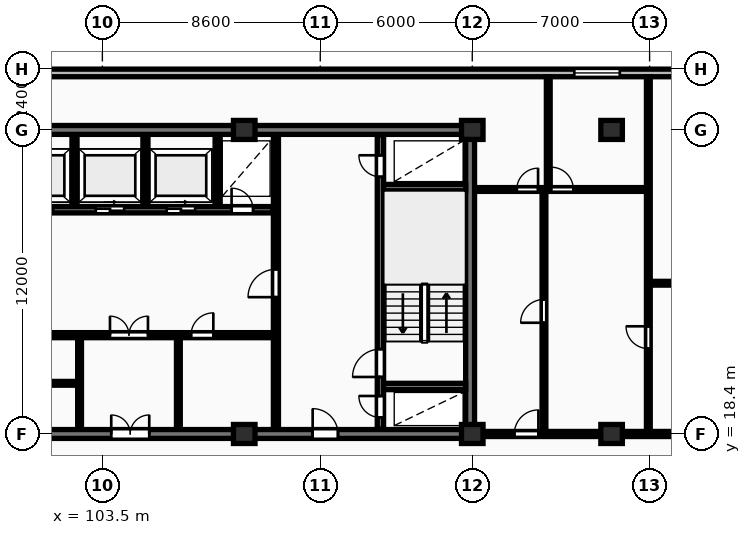
"""IFC4 building model, lengths in metres.
Left out: names, types, materials, properties, quantities, classifications, styles, units other than length and angle.
Written with IfcOpenShell. Run it as: python <this file> out.ifc"""

import sys

from ifc_helpers import new_model, si_unit, direction, frame, frame_2d, origin, origin_2d, place, context, subcontext, project, spatial, rectangle, extrude, element, fill, save


model = new_model("IFC4")
c1 = context("Model", 3, precision=1e-05, world=origin(), true_north=direction((0.0, 1.0)))
c2 = subcontext(c1, "Body", "Model", "MODEL_VIEW")
j1 = project(units=[si_unit("LENGTHUNIT", "METRE"), si_unit("PLANEANGLEUNIT", "RADIAN")], contexts=[c1])
p1 = place(None, origin())
s1 = spatial("IfcSite", under=j1, at=p1, CompositionType="ELEMENT")
p2 = place(p1, origin())
s2 = spatial("IfcBuilding", under=s1, at=p2, CompositionType="ELEMENT")
p3 = place(p2, frame((0.0, 0.0, 100.3)))
s3 = spatial("IfcBuildingStorey", under=s2, at=p3, CompositionType="ELEMENT", Elevation=100.3)
for number, where, z_axis, x_axis in (
    (1, (109.1, 18.4, 0.0), (0.0, 0.0, 1.0), (1.0, 0.0, 0.0)),
    (2, (109.1, 30.4, 0.0), (0.0, 0.0, 1.0), (1.0, 0.0, 0.0)),
    (3, (118.1, 18.4, 0.0), (0.0, 0.0, 1.0), (1.0, 0.0, 0.0)),
    (4, (118.1, 30.4, 0.0), (0.0, 0.0, 1.0), (1.0, 0.0, 0.0)),
    (5, (123.6, 18.4, 0.0), (0.0, 0.0, 1.0), (1.0, 0.0, 0.0)),
    (6, (123.6, 30.4, 0.0), (0.0, 0.0, 1.0), (1.0, 0.0, 0.0)),
):
    element("IfcColumn", number, at=place(p3, frame(where, z_axis=z_axis, x_axis=x_axis)), inside=s3, PredefinedType="COLUMN", context=c2, shape_type="SweptSolid", body=[
        extrude(rectangle(XDim=0.85, YDim=0.75, at=origin_2d()), origin(), (0.0, 0.0, 1.0), 3.25),
    ])
p4 = place(p3, frame((130.7, 32.65, 0.0), z_axis=(0.0, 0.0, 1.0), x_axis=(-1.0, 0.0, 0.0)))
e7 = element("IfcWall", 7, at=p4, inside=s3, PredefinedType="STANDARD", context=c2, shape_type="SweptSolid", body=[
    extrude(rectangle(XDim=58.0, YDim=0.3, at=frame_2d((29.0, 0.0))), origin(), (0.0, 0.0, 1.0), 2.97),
])
p5 = place(p4, frame((50.125, 0.0, 0.85)))
e8 = element("IfcOpeningElement", 8, at=p5, cuts=e7, PredefinedType="OPENING", context=c2, shape_type="SweptSolid", body=[
    extrude(rectangle(XDim=1.8, YDim=1.8, at=frame_2d((0.9, 0.9))), frame((0.0, 0.16, 0.0), z_axis=(0.0, -1.0, 0.0), x_axis=(1.0, 0.0, 0.0)), (0.0, 0.0, 1.0), 0.32),
])
p6 = place(p4, frame((6.775, 0.0, 0.85)))
e9 = element("IfcOpeningElement", 9, at=p6, cuts=e7, PredefinedType="OPENING", context=c2, shape_type="SweptSolid", body=[
    extrude(rectangle(XDim=1.8, YDim=1.8, at=frame_2d((0.9, 0.9))), frame((0.0, 0.16, 0.0), z_axis=(0.0, -1.0, 0.0), x_axis=(1.0, 0.0, 0.0)), (0.0, 0.0, 1.0), 0.32),
])
p7 = place(p3, frame((81.925, 30.4, 0.0), z_axis=(0.0, 0.0, 1.0), x_axis=(1.0, 0.0, 0.0)))
e10 = element("IfcWall", 10, at=p7, inside=s3, PredefinedType="SHEAR", context=c2, shape_type="SweptSolid", body=[
    extrude(rectangle(XDim=36.265, YDim=0.35, at=frame_2d((18.132, 0.0))), origin(), (0.0, 0.0, 1.0), 3.25),
])
p8 = place(p3, frame((118.015, 18.575, 0.0), z_axis=(0.0, 0.0, 1.0), x_axis=(0.0, 1.0, 0.0)))
e11 = element("IfcWall", 11, at=p8, inside=s3, PredefinedType="SHEAR", context=c2, shape_type="SweptSolid", body=[
    extrude(rectangle(XDim=11.65, YDim=0.35, at=frame_2d((5.825, 0.0))), origin(), (0.0, 0.0, 1.0), 3.25),
])
p9 = place(p3, frame((81.925, 18.4, 0.0), z_axis=(0.0, 0.0, 1.0), x_axis=(1.0, 0.0, 0.0)))
e12 = element("IfcWall", 12, at=p9, inside=s3, PredefinedType="SHEAR", context=c2, shape_type="SweptSolid", body=[
    extrude(rectangle(XDim=36.265, YDim=0.35, at=frame_2d((18.132, 0.0))), origin(), (0.0, 0.0, 1.0), 3.25),
])
p10 = place(p9, frame((5.675, 0.0, 0.0)))
e13 = element("IfcOpeningElement", 13, at=p10, cuts=e12, PredefinedType="OPENING", context=c2, shape_type="SweptSolid", body=[
    extrude(rectangle(XDim=1.0, YDim=2.15, at=frame_2d((0.5, 1.075))), frame((0.0, 0.185, 0.0), z_axis=(0.0, -1.0, 0.0), x_axis=(1.0, 0.0, 0.0)), (0.0, 0.0, 1.0), 0.37),
])
p11 = place(p9, frame((21.925, 0.0, 0.0)))
e14 = element("IfcOpeningElement", 14, at=p11, cuts=e12, PredefinedType="OPENING", context=c2, shape_type="SweptSolid", body=[
    extrude(rectangle(XDim=1.5, YDim=2.2, at=frame_2d((0.75, 1.1))), frame((0.0, 0.185, 0.0), z_axis=(0.0, -1.0, 0.0), x_axis=(1.0, 0.0, 0.0)), (0.0, 0.0, 1.0), 0.37),
])
p12 = place(p9, frame((29.875, 0.0, 0.0)))
e15 = element("IfcOpeningElement", 15, at=p12, cuts=e12, PredefinedType="OPENING", context=c2, shape_type="SweptSolid", body=[
    extrude(rectangle(XDim=1.0, YDim=2.15, at=frame_2d((0.5, 1.075))), frame((0.0, 0.185, 0.0), z_axis=(0.0, -1.0, 0.0), x_axis=(1.0, 0.0, 0.0)), (0.0, 0.0, 1.0), 0.37),
])
for number, where, z_axis, x_axis in (
    (16, (102.4, 27.38, 0.0), (0.0, 0.0, 1.0), (0.0, 1.0, 0.0)),
    (17, (105.2, 27.38, 0.0), (0.0, 0.0, 1.0), (0.0, 1.0, 0.0)),
    (18, (108.05, 27.38, 0.0), (0.0, 0.0, 1.0), (0.0, 1.0, 0.0)),
):
    element("IfcWall", number, at=place(p3, frame(where, z_axis=z_axis, x_axis=x_axis)), inside=s3, PredefinedType="PARTITIONING", context=c2, shape_type="SweptSolid", body=[
        extrude(rectangle(XDim=2.82, YDim=0.2, at=frame_2d((1.41, 0.0))), origin(), (0.0, 0.0, 1.0), 2.97),
    ])
p13 = place(p3, frame((99.68, 27.25, 0.0), z_axis=(0.0, 0.0, 1.0), x_axis=(1.0, 0.0, 0.0)))
e19 = element("IfcWall", 19, at=p13, inside=s3, PredefinedType="SHEAR", context=c2, shape_type="SweptSolid", body=[
    extrude(rectangle(XDim=10.54, YDim=0.25, at=frame_2d((5.27, 0.0))), origin(), (0.0, 0.0, 1.0), 3.25),
])
p14 = place(p13, frame((0.76, 0.0, 0.0)))
e20 = element("IfcOpeningElement", 20, at=p14, cuts=e19, PredefinedType="OPENING", context=c2, shape_type="SweptSolid", body=[
    extrude(rectangle(XDim=1.12, YDim=2.12, at=frame_2d((0.56, 1.06))), frame((0.0, 0.135, 0.0), z_axis=(0.0, -1.0, 0.0), x_axis=(1.0, 0.0, 0.0)), (0.0, 0.0, 1.0), 0.27),
])
p15 = place(p13, frame((3.56, 0.0, 0.0)))
e21 = element("IfcOpeningElement", 21, at=p15, cuts=e19, PredefinedType="OPENING", context=c2, shape_type="SweptSolid", body=[
    extrude(rectangle(XDim=1.12, YDim=2.12, at=frame_2d((0.56, 1.06))), frame((0.0, 0.135, 0.0), z_axis=(0.0, -1.0, 0.0), x_axis=(1.0, 0.0, 0.0)), (0.0, 0.0, 1.0), 0.27),
])
p16 = place(p13, frame((6.36, 0.0, 0.0)))
e22 = element("IfcOpeningElement", 22, at=p16, cuts=e19, PredefinedType="OPENING", context=c2, shape_type="SweptSolid", body=[
    extrude(rectangle(XDim=1.12, YDim=2.12, at=frame_2d((0.56, 1.06))), frame((0.0, 0.135, 0.0), z_axis=(0.0, -1.0, 0.0), x_axis=(1.0, 0.0, 0.0)), (0.0, 0.0, 1.0), 0.27),
])
p17 = place(p13, frame((8.92, 0.0, 0.0)))
e23 = element("IfcOpeningElement", 23, at=p17, cuts=e19, PredefinedType="OPENING", context=c2, shape_type="SweptSolid", body=[
    extrude(rectangle(XDim=0.85, YDim=2.05, at=frame_2d((0.425, 1.025))), frame((0.0, 0.135, 0.0), z_axis=(0.0, -1.0, 0.0), x_axis=(1.0, 0.0, 0.0)), (0.0, 0.0, 1.0), 0.27),
])
p18 = place(p3, frame((95.9, 20.4, 0.0), z_axis=(0.0, 0.0, 1.0), x_axis=(1.0, 0.0, 0.0)))
e24 = element("IfcWall", 24, at=p18, inside=s3, PredefinedType="PARTITIONING", context=c2, shape_type="SweptSolid", body=[
    extrude(rectangle(XDim=6.7, YDim=0.15, at=frame_2d((3.35, 0.0))), origin(), (0.0, 0.0, 1.0), 2.97),
])
p19 = place(p18, frame((1.6, 0.0, 0.0)))
e25 = element("IfcOpeningElement", 25, at=p19, cuts=e24, PredefinedType="OPENING", context=c2, shape_type="SweptSolid", body=[
    extrude(rectangle(XDim=0.88, YDim=2.06, at=frame_2d((0.44, 1.03))), frame((0.0, 0.085, 0.0), z_axis=(0.0, -1.0, 0.0), x_axis=(1.0, 0.0, 0.0)), (0.0, 0.0, 1.0), 0.17),
])
for number, where, z_axis, x_axis in (
    (26, (102.6, 18.6, 0.0), (0.0, 0.0, 1.0), (0.0, 1.0, 0.0)),
    (27, (106.5, 18.6, 0.0), (0.0, 0.0, 1.0), (0.0, 1.0, 0.0)),
):
    element("IfcWall", number, at=place(p3, frame(where, z_axis=z_axis, x_axis=x_axis)), inside=s3, PredefinedType="PARTITIONING", context=c2, shape_type="SweptSolid", body=[
        extrude(rectangle(XDim=3.6, YDim=0.15, at=frame_2d((1.8, 0.0))), origin(), (0.0, 0.0, 1.0), 2.97),
    ])
p20 = place(p3, frame((91.08, 22.3, 0.0), z_axis=(0.0, 0.0, 1.0), x_axis=(1.0, 0.0, 0.0)))
e28 = element("IfcWall", 28, at=p20, inside=s3, PredefinedType="PARTITIONING", context=c2, shape_type="SweptSolid", body=[
    extrude(rectangle(XDim=19.14, YDim=0.2, at=frame_2d((9.57, 0.0))), origin(), (0.0, 0.0, 1.0), 2.97),
])
p21 = place(p20, frame((1.15, 0.0, 0.0)))
e29 = element("IfcOpeningElement", 29, at=p21, cuts=e28, PredefinedType="OPENING", context=c2, shape_type="SweptSolid", body=[
    extrude(rectangle(XDim=0.85, YDim=2.05, at=frame_2d((0.425, 1.025))), frame((0.0, 0.11, 0.0), z_axis=(0.0, -1.0, 0.0), x_axis=(1.0, 0.0, 0.0)), (0.0, 0.0, 1.0), 0.22),
])
p22 = place(p20, frame((3.2, 0.0, 0.0)))
e30 = element("IfcOpeningElement", 30, at=p22, cuts=e28, PredefinedType="OPENING", context=c2, shape_type="SweptSolid", body=[
    extrude(rectangle(XDim=0.85, YDim=2.05, at=frame_2d((0.425, 1.025))), frame((0.0, 0.11, 0.0), z_axis=(0.0, -1.0, 0.0), x_axis=(1.0, 0.0, 0.0)), (0.0, 0.0, 1.0), 0.22),
])
p23 = place(p20, frame((12.72, 0.0, 0.0)))
e31 = element("IfcOpeningElement", 31, at=p23, cuts=e28, PredefinedType="OPENING", context=c2, shape_type="SweptSolid", body=[
    extrude(rectangle(XDim=1.5, YDim=2.2, at=frame_2d((0.75, 1.1))), frame((0.0, 0.11, 0.0), z_axis=(0.0, -1.0, 0.0), x_axis=(1.0, 0.0, 0.0)), (0.0, 0.0, 1.0), 0.22),
])
p24 = place(p20, frame((6.42, 0.0, 0.0)))
e32 = element("IfcOpeningElement", 32, at=p24, cuts=e28, PredefinedType="OPENING", context=c2, shape_type="SweptSolid", body=[
    extrude(rectangle(XDim=0.92, YDim=2.08, at=frame_2d((0.46, 1.04))), frame((0.0, 0.11, 0.0), z_axis=(0.0, -1.0, 0.0), x_axis=(1.0, 0.0, 0.0)), (0.0, 0.0, 1.0), 0.22),
])
p25 = place(p20, frame((15.92, 0.0, 0.0)))
e33 = element("IfcOpeningElement", 33, at=p25, cuts=e28, PredefinedType="OPENING", context=c2, shape_type="SweptSolid", body=[
    extrude(rectangle(XDim=0.88, YDim=2.06, at=frame_2d((0.44, 1.03))), frame((0.0, 0.11, 0.0), z_axis=(0.0, -1.0, 0.0), x_axis=(1.0, 0.0, 0.0)), (0.0, 0.0, 1.0), 0.22),
])
p26 = place(p3, frame((110.35, 18.6, 0.0), z_axis=(0.0, 0.0, 1.0), x_axis=(0.0, 1.0, 0.0)))
e34 = element("IfcWall", 34, at=p26, inside=s3, PredefinedType="PARTITIONING", context=c2, shape_type="SweptSolid", body=[
    extrude(rectangle(XDim=11.6, YDim=0.2, at=frame_2d((5.8, 0.0))), origin(), (0.0, 0.0, 1.0), 2.97),
])
p27 = place(p26, frame((5.2, 0.0, 0.0)))
e35 = element("IfcOpeningElement", 35, at=p27, cuts=e34, PredefinedType="OPENING", context=c2, shape_type="SweptSolid", body=[
    extrude(rectangle(XDim=1.1, YDim=2.15, at=frame_2d((0.55, 1.075))), frame((0.0, 0.11, 0.0), z_axis=(0.0, -1.0, 0.0), x_axis=(1.0, 0.0, 0.0)), (0.0, 0.0, 1.0), 0.22),
])
p28 = place(p3, frame((114.475, 18.6, 0.0), z_axis=(0.0, 0.0, 1.0), x_axis=(0.0, 1.0, 0.0)))
e36 = element("IfcWall", 36, at=p28, inside=s3, PredefinedType="SHEAR", context=c2, shape_type="SweptSolid", body=[
    extrude(rectangle(XDim=11.6, YDim=0.25, at=frame_2d((5.8, 0.0))), origin(), (0.0, 0.0, 1.0), 3.25),
])
p29 = place(p28, frame((0.45, 0.0, 0.0)))
e37 = element("IfcOpeningElement", 37, at=p29, cuts=e36, PredefinedType="OPENING", context=c2, shape_type="SweptSolid", body=[
    extrude(rectangle(XDim=0.85, YDim=2.05, at=frame_2d((0.425, 1.025))), frame((0.0, 0.135, 0.0), z_axis=(0.0, -1.0, 0.0), x_axis=(1.0, 0.0, 0.0)), (0.0, 0.0, 1.0), 0.27),
])
p30 = place(p28, frame((2.05, 0.0, 0.0)))
e38 = element("IfcOpeningElement", 38, at=p30, cuts=e36, PredefinedType="OPENING", context=c2, shape_type="SweptSolid", body=[
    extrude(rectangle(XDim=1.1, YDim=2.1, at=frame_2d((0.55, 1.05))), frame((0.0, 0.135, 0.0), z_axis=(0.0, -1.0, 0.0), x_axis=(1.0, 0.0, 0.0)), (0.0, 0.0, 1.0), 0.27),
])
p31 = place(p28, frame((9.95, 0.0, 0.0)))
e39 = element("IfcOpeningElement", 39, at=p31, cuts=e36, PredefinedType="OPENING", context=c2, shape_type="SweptSolid", body=[
    extrude(rectangle(XDim=0.85, YDim=2.05, at=frame_2d((0.425, 1.025))), frame((0.0, 0.135, 0.0), z_axis=(0.0, -1.0, 0.0), x_axis=(1.0, 0.0, 0.0)), (0.0, 0.0, 1.0), 0.27),
])
for number, where, z_axis, x_axis in (
    (40, (114.6, 20.275, 0.0), (0.0, 0.0, 1.0), (1.0, 0.0, 0.0)),
    (41, (114.6, 28.125, 0.0), (0.0, 0.0, 1.0), (1.0, 0.0, 0.0)),
):
    element("IfcWall", number, at=place(p3, frame(where, z_axis=z_axis, x_axis=x_axis)), inside=s3, PredefinedType="SHEAR", context=c2, shape_type="SweptSolid", body=[
        extrude(rectangle(XDim=3.24, YDim=0.25, at=frame_2d((1.62, 0.0))), origin(), (0.0, 0.0, 1.0), 3.25),
    ])
p32 = place(p3, frame((125.05, 24.35, 0.0), z_axis=(0.0, 0.0, 1.0), x_axis=(1.0, 0.0, 0.0)))
e42 = element("IfcWall", 42, at=p32, inside=s3, PredefinedType="PARTITIONING", context=c2, shape_type="SweptSolid", body=[
    extrude(rectangle(XDim=5.65, YDim=0.15, at=frame_2d((2.825, 0.0))), origin(), (0.0, 0.0, 1.0), 2.97),
])
p33 = place(p32, frame((2.405, 0.0, 0.0)))
e43 = element("IfcOpeningElement", 43, at=p33, cuts=e42, PredefinedType="OPENING", context=c2, shape_type="SweptSolid", body=[
    extrude(rectangle(XDim=0.84, YDim=2.04, at=frame_2d((0.42, 1.02))), frame((0.0, 0.085, 0.0), z_axis=(0.0, -1.0, 0.0), x_axis=(1.0, 0.0, 0.0)), (0.0, 0.0, 1.0), 0.17),
])
p34 = place(p3, frame((125.05, 18.45, 0.0), z_axis=(0.0, 0.0, 1.0), x_axis=(0.0, 1.0, 0.0)))
e44 = element("IfcWall", 44, at=p34, inside=s3, PredefinedType="PARTITIONING", context=c2, shape_type="SweptSolid", body=[
    extrude(rectangle(XDim=14.05, YDim=0.15, at=frame_2d((7.025, 0.0))), origin(), (0.0, 0.0, 1.0), 2.97),
])
p35 = place(p34, frame((3.32, 0.0, 0.0)))
e45 = element("IfcOpeningElement", 45, at=p35, cuts=e44, PredefinedType="OPENING", context=c2, shape_type="SweptSolid", body=[
    extrude(rectangle(XDim=0.88, YDim=2.06, at=frame_2d((0.44, 1.03))), frame((0.0, 0.085, 0.0), z_axis=(0.0, -1.0, 0.0), x_axis=(1.0, 0.0, 0.0)), (0.0, 0.0, 1.0), 0.17),
])
p36 = place(p3, frame((120.93, 18.45, 0.0), z_axis=(0.0, 0.0, 1.0), x_axis=(0.0, 1.0, 0.0)))
e46 = element("IfcWall", 46, at=p36, inside=s3, PredefinedType="PARTITIONING", context=c2, shape_type="SweptSolid", body=[
    extrude(rectangle(XDim=9.6, YDim=0.15, at=frame_2d((4.8, 0.0))), origin(), (0.0, 0.0, 1.0), 2.97),
])
p37 = place(p36, frame((4.34, 0.0, 0.0)))
e47 = element("IfcOpeningElement", 47, at=p37, cuts=e46, PredefinedType="OPENING", context=c2, shape_type="SweptSolid", body=[
    extrude(rectangle(XDim=0.92, YDim=2.08, at=frame_2d((0.46, 1.04))), frame((0.0, 0.085, 0.0), z_axis=(0.0, -1.0, 0.0), x_axis=(1.0, 0.0, 0.0)), (0.0, 0.0, 1.0), 0.17),
])
p38 = place(p3, frame((121.1, 28.05, 0.0), z_axis=(0.0, 0.0, 1.0), x_axis=(0.0, 1.0, 0.0)))
e48 = element("IfcWall", 48, at=p38, inside=s3, PredefinedType="PARTITIONING", context=c2, shape_type="SweptSolid", body=[
    extrude(rectangle(XDim=4.45, YDim=0.15, at=frame_2d((2.225, 0.0))), origin(), (0.0, 0.0, 1.0), 2.97),
])
p39 = place(p3, frame((118.27, 28.05, 0.0), z_axis=(0.0, 0.0, 1.0), x_axis=(1.0, 0.0, 0.0)))
e49 = element("IfcWall", 49, at=p39, inside=s3, PredefinedType="PARTITIONING", context=c2, shape_type="SweptSolid", body=[
    extrude(rectangle(XDim=6.76, YDim=0.15, at=frame_2d((3.38, 0.0))), origin(), (0.0, 0.0, 1.0), 2.97),
])
p40 = place(p39, frame((1.587, 0.0, 0.0)))
e50 = element("IfcOpeningElement", 50, at=p40, cuts=e49, PredefinedType="OPENING", context=c2, shape_type="SweptSolid", body=[
    extrude(rectangle(XDim=0.84, YDim=2.04, at=frame_2d((0.42, 1.02))), frame((0.0, 0.085, 0.0), z_axis=(0.0, -1.0, 0.0), x_axis=(1.0, 0.0, 0.0)), (0.0, 0.0, 1.0), 0.17),
])
p41 = place(p39, frame((2.94, 0.0, 0.0)))
e51 = element("IfcOpeningElement", 51, at=p41, cuts=e49, PredefinedType="OPENING", context=c2, shape_type="SweptSolid", body=[
    extrude(rectangle(XDim=0.88, YDim=2.06, at=frame_2d((0.44, 1.03))), frame((0.0, 0.085, 0.0), z_axis=(0.0, -1.0, 0.0), x_axis=(1.0, 0.0, 0.0)), (0.0, 0.0, 1.0), 0.17),
])
p42 = place(p3, frame((118.25, 18.4, 0.0), z_axis=(0.0, 0.0, 1.0), x_axis=(1.0, 0.0, 0.0)))
e52 = element("IfcWall", 52, at=p42, inside=s3, PredefinedType="PARTITIONING", context=c2, shape_type="SweptSolid", body=[
    extrude(rectangle(XDim=12.45, YDim=0.2, at=frame_2d((6.225, 0.0))), origin(), (0.0, 0.0, 1.0), 2.358),
])
p43 = place(p42, frame((1.51, 0.0, 0.0)))
e53 = element("IfcOpeningElement", 53, at=p43, cuts=e52, PredefinedType="OPENING", context=c2, shape_type="SweptSolid", body=[
    extrude(rectangle(XDim=0.95, YDim=2.15, at=frame_2d((0.475, 1.075))), frame((0.0, 0.11, 0.0), z_axis=(0.0, -1.0, 0.0), x_axis=(1.0, 0.0, 0.0)), (0.0, 0.0, 1.0), 0.22),
])
p44 = place(p6, origin())
e54 = element("IfcWindow", 54, at=p44, inside=s3, PartitioningType="SINGLE_PANEL", PredefinedType="WINDOW", context=c2, shape_type="SweptSolid", body=[
    extrude(rectangle(XDim=1.8, YDim=1.8, at=frame_2d((0.9, 0.9))), frame((0.0, 0.03, 0.0), z_axis=(0.0, -1.0, 0.0), x_axis=(1.0, 0.0, 0.0)), (0.0, 0.0, 1.0), 0.06),
])
fill(e9, e54)
p45 = place(p11, origin())
e55 = element("IfcDoor", 55, at=p45, inside=s3, OperationType="DOUBLE_DOOR_SINGLE_SWING", PredefinedType="DOOR", context=c2, shape_type="SweptSolid", body=[
    extrude(rectangle(XDim=1.5, YDim=2.2, at=frame_2d((0.75, 1.1))), frame((0.0, 0.025, 0.0), z_axis=(0.0, -1.0, 0.0), x_axis=(1.0, 0.0, 0.0)), (0.0, 0.0, 1.0), 0.05),
])
fill(e14, e55)
p46 = place(p12, origin())
e56 = element("IfcDoor", 56, at=p46, inside=s3, OperationType="SINGLE_SWING_LEFT", PredefinedType="DOOR", context=c2, shape_type="SweptSolid", body=[
    extrude(rectangle(XDim=1.0, YDim=2.15, at=frame_2d((0.5, 1.075))), frame((0.0, 0.025, 0.0), z_axis=(0.0, -1.0, 0.0), x_axis=(1.0, 0.0, 0.0)), (0.0, 0.0, 1.0), 0.05),
])
fill(e15, e56)
p47 = place(p14, origin())
e57 = element("IfcDoor", 57, at=p47, inside=s3, OperationType="SLIDING_TO_RIGHT", PredefinedType="DOOR", context=c2, shape_type="SweptSolid", body=[
    extrude(rectangle(XDim=1.12, YDim=2.12, at=frame_2d((0.56, 1.06))), frame((0.0, 0.025, 0.0), z_axis=(0.0, -1.0, 0.0), x_axis=(1.0, 0.0, 0.0)), (0.0, 0.0, 1.0), 0.05),
])
fill(e20, e57)
p48 = place(p15, origin())
e58 = element("IfcDoor", 58, at=p48, inside=s3, OperationType="SLIDING_TO_RIGHT", PredefinedType="DOOR", context=c2, shape_type="SweptSolid", body=[
    extrude(rectangle(XDim=1.12, YDim=2.12, at=frame_2d((0.56, 1.06))), frame((0.0, 0.025, 0.0), z_axis=(0.0, -1.0, 0.0), x_axis=(1.0, 0.0, 0.0)), (0.0, 0.0, 1.0), 0.05),
])
fill(e21, e58)
p49 = place(p16, origin())
e59 = element("IfcDoor", 59, at=p49, inside=s3, OperationType="SLIDING_TO_RIGHT", PredefinedType="DOOR", context=c2, shape_type="SweptSolid", body=[
    extrude(rectangle(XDim=1.12, YDim=2.12, at=frame_2d((0.56, 1.06))), frame((0.0, 0.025, 0.0), z_axis=(0.0, -1.0, 0.0), x_axis=(1.0, 0.0, 0.0)), (0.0, 0.0, 1.0), 0.05),
])
fill(e22, e59)
p50 = place(p17, origin())
e60 = element("IfcDoor", 60, at=p50, inside=s3, OperationType="SINGLE_SWING_LEFT", PredefinedType="DOOR", context=c2, shape_type="SweptSolid", body=[
    extrude(rectangle(XDim=0.85, YDim=2.05, at=frame_2d((0.425, 1.025))), frame((0.0, 0.025, 0.0), z_axis=(0.0, -1.0, 0.0), x_axis=(1.0, 0.0, 0.0)), (0.0, 0.0, 1.0), 0.05),
])
fill(e23, e60)
p51 = place(p23, origin())
e61 = element("IfcDoor", 61, at=p51, inside=s3, OperationType="DOUBLE_DOOR_SINGLE_SWING", PredefinedType="DOOR", context=c2, shape_type="SweptSolid", body=[
    extrude(rectangle(XDim=1.5, YDim=2.2, at=frame_2d((0.75, 1.1))), frame((0.0, 0.025, 0.0), z_axis=(0.0, -1.0, 0.0), x_axis=(1.0, 0.0, 0.0)), (0.0, 0.0, 1.0), 0.05),
])
fill(e31, e61)
p52 = place(p25, origin())
e62 = element("IfcDoor", 62, at=p52, inside=s3, OperationType="SINGLE_SWING_RIGHT", PredefinedType="DOOR", context=c2, shape_type="SweptSolid", body=[
    extrude(rectangle(XDim=0.88, YDim=2.06, at=frame_2d((0.44, 1.03))), frame((0.0, 0.025, 0.0), z_axis=(0.0, -1.0, 0.0), x_axis=(1.0, 0.0, 0.0)), (0.0, 0.0, 1.0), 0.05),
])
fill(e33, e62)
p53 = place(p27, origin())
e63 = element("IfcDoor", 63, at=p53, inside=s3, OperationType="SINGLE_SWING_LEFT", PredefinedType="DOOR", context=c2, shape_type="SweptSolid", body=[
    extrude(rectangle(XDim=1.1, YDim=2.15, at=frame_2d((0.55, 1.075))), frame((0.0, 0.025, 0.0), z_axis=(0.0, -1.0, 0.0), x_axis=(1.0, 0.0, 0.0)), (0.0, 0.0, 1.0), 0.05),
])
fill(e35, e63)
p54 = place(p29, origin())
e64 = element("IfcDoor", 64, at=p54, inside=s3, OperationType="SINGLE_SWING_RIGHT", PredefinedType="DOOR", context=c2, shape_type="SweptSolid", body=[
    extrude(rectangle(XDim=0.85, YDim=2.05, at=frame_2d((0.425, 1.025))), frame((0.0, 0.025, 0.0), z_axis=(0.0, -1.0, 0.0), x_axis=(1.0, 0.0, 0.0)), (0.0, 0.0, 1.0), 0.05),
])
fill(e37, e64)
p55 = place(p30, origin())
e65 = element("IfcDoor", 65, at=p55, inside=s3, OperationType="SINGLE_SWING_LEFT", PredefinedType="DOOR", context=c2, shape_type="SweptSolid", body=[
    extrude(rectangle(XDim=1.1, YDim=2.1, at=frame_2d((0.55, 1.05))), frame((0.0, 0.025, 0.0), z_axis=(0.0, -1.0, 0.0), x_axis=(1.0, 0.0, 0.0)), (0.0, 0.0, 1.0), 0.05),
])
fill(e38, e65)
p56 = place(p31, origin())
e66 = element("IfcDoor", 66, at=p56, inside=s3, OperationType="SINGLE_SWING_RIGHT", PredefinedType="DOOR", context=c2, shape_type="SweptSolid", body=[
    extrude(rectangle(XDim=0.85, YDim=2.05, at=frame_2d((0.425, 1.025))), frame((0.0, 0.025, 0.0), z_axis=(0.0, -1.0, 0.0), x_axis=(1.0, 0.0, 0.0)), (0.0, 0.0, 1.0), 0.05),
])
fill(e39, e66)
p57 = place(p35, origin())
e67 = element("IfcDoor", 67, at=p57, inside=s3, OperationType="SINGLE_SWING_RIGHT", PredefinedType="DOOR", context=c2, shape_type="SweptSolid", body=[
    extrude(rectangle(XDim=0.88, YDim=2.06, at=frame_2d((0.44, 1.03))), frame((0.0, 0.025, 0.0), z_axis=(0.0, -1.0, 0.0), x_axis=(1.0, 0.0, 0.0)), (0.0, 0.0, 1.0), 0.05),
])
fill(e45, e67)
p58 = place(p37, origin())
e68 = element("IfcDoor", 68, at=p58, inside=s3, OperationType="SINGLE_SWING_LEFT", PredefinedType="DOOR", context=c2, shape_type="SweptSolid", body=[
    extrude(rectangle(XDim=0.92, YDim=2.08, at=frame_2d((0.46, 1.04))), frame((0.0, 0.025, 0.0), z_axis=(0.0, -1.0, 0.0), x_axis=(1.0, 0.0, 0.0)), (0.0, 0.0, 1.0), 0.05),
])
fill(e47, e68)
p59 = place(p40, origin())
e69 = element("IfcDoor", 69, at=p59, inside=s3, OperationType="SINGLE_SWING_RIGHT", PredefinedType="DOOR", context=c2, shape_type="SweptSolid", body=[
    extrude(rectangle(XDim=0.84, YDim=2.04, at=frame_2d((0.42, 1.02))), frame((0.0, 0.025, 0.0), z_axis=(0.0, -1.0, 0.0), x_axis=(1.0, 0.0, 0.0)), (0.0, 0.0, 1.0), 0.05),
])
fill(e50, e69)
p60 = place(p41, origin())
e70 = element("IfcDoor", 70, at=p60, inside=s3, OperationType="SINGLE_SWING_LEFT", PredefinedType="DOOR", context=c2, shape_type="SweptSolid", body=[
    extrude(rectangle(XDim=0.88, YDim=2.06, at=frame_2d((0.44, 1.03))), frame((0.0, 0.025, 0.0), z_axis=(0.0, -1.0, 0.0), x_axis=(1.0, 0.0, 0.0)), (0.0, 0.0, 1.0), 0.05),
])
fill(e51, e70)
p61 = place(p43, origin())
e71 = element("IfcDoor", 71, at=p61, inside=s3, OperationType="SINGLE_SWING_RIGHT", PredefinedType="DOOR", context=c2, shape_type="SweptSolid", body=[
    extrude(rectangle(XDim=0.95, YDim=2.15, at=frame_2d((0.475, 1.075))), frame((0.0, 0.025, 0.0), z_axis=(0.0, -1.0, 0.0), x_axis=(1.0, 0.0, 0.0)), (0.0, 0.0, 1.0), 0.05),
])
fill(e53, e71)
save(model, sys.argv[1])
